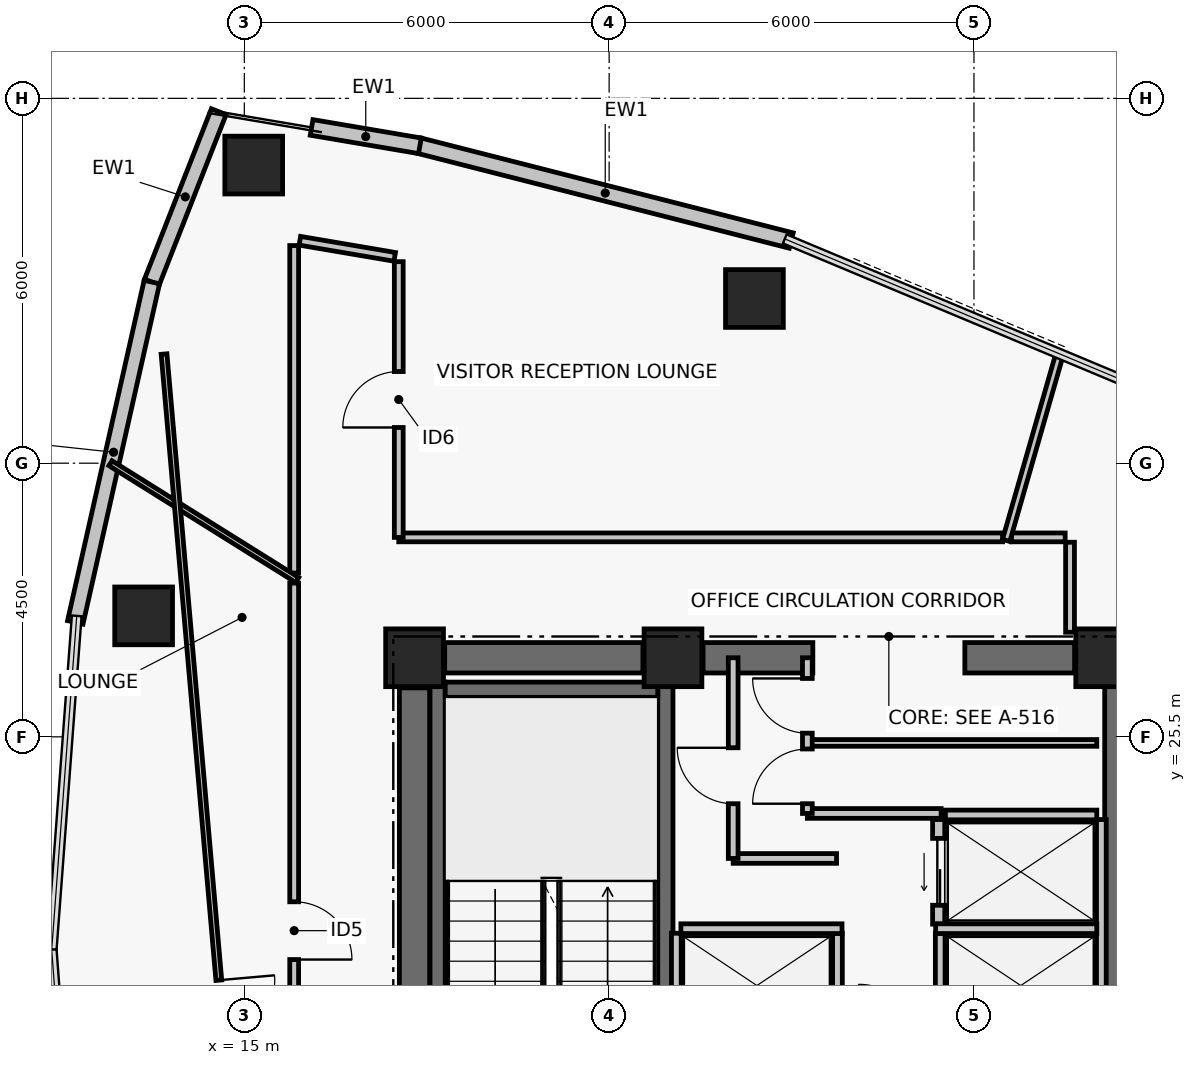
"""IFC4 building model, lengths in metres.
Left out: names, types, materials, properties, quantities, classifications, styles, units other than length and angle.
Written with IfcOpenShell. Run it as: python <this file> out.ifc"""

import sys

from ifc_helpers import new_model, si_unit, direction, frame, frame_2d, origin, origin_2d, place, context, subcontext, project, spatial, rectangle, hollow_rectangle, extrude, element, fill, save


model = new_model("IFC4")
c1 = context("Model", 3, precision=1e-05, world=origin(), true_north=direction((0.0, 1.0)))
c2 = subcontext(c1, "Body", "Model", "MODEL_VIEW")
j1 = project(units=[si_unit("LENGTHUNIT", "METRE"), si_unit("PLANEANGLEUNIT", "RADIAN")], contexts=[c1])
p1 = place(None, origin())
s1 = spatial("IfcSite", under=j1, at=p1, CompositionType="ELEMENT")
p2 = place(p1, origin())
s2 = spatial("IfcBuilding", under=s1, at=p2, CompositionType="ELEMENT")
p3 = place(p2, frame((0.0, 0.0, 219.54)))
s3 = spatial("IfcBuildingStorey", under=s2, at=p3, CompositionType="ELEMENT", Elevation=219.54)
for number, where, z_axis, x_axis in (
    (1, (17.8, 26.8, 0.0), (0.0, 0.0, 1.0), (1.0, 0.0, 0.0)),
    (2, (22.05, 26.8, 0.0), (0.0, 0.0, 1.0), (1.0, 0.0, 0.0)),
    (3, (29.15, 26.8, 0.0), (0.0, 0.0, 1.0), (1.0, 0.0, 0.0)),
):
    element("IfcColumn", number, at=place(p3, frame(where, z_axis=z_axis, x_axis=x_axis)), inside=s3, PredefinedType="COLUMN", context=c2, shape_type="SweptSolid", body=[
        extrude(rectangle(XDim=0.95, YDim=0.95, at=origin_2d()), origin(), (0.0, 0.0, 1.0), 3.72),
    ])
p4 = place(p3, frame((18.295, 26.8, 0.0), z_axis=(0.0, 0.0, 1.0), x_axis=(1.0, 0.0, 0.0)))
e4 = element("IfcWall", 4, at=p4, inside=s3, PredefinedType="SHEAR", context=c2, shape_type="SweptSolid", body=[
    extrude(rectangle(XDim=3.26, YDim=0.5, at=frame_2d((1.63, 0.0))), origin(), (0.0, 0.0, 1.0), 3.5),
])
p5 = place(p3, frame((22.545, 26.8, 0.0), z_axis=(0.0, 0.0, 1.0), x_axis=(1.0, 0.0, 0.0)))
e5 = element("IfcWall", 5, at=p5, inside=s3, PredefinedType="SHEAR", context=c2, shape_type="SweptSolid", body=[
    extrude(rectangle(XDim=1.805, YDim=0.5, at=frame_2d((0.903, 0.0))), origin(), (0.0, 0.0, 1.0), 3.5),
])
p6 = place(p3, frame((26.85, 26.8, 0.0), z_axis=(0.0, 0.0, 1.0), x_axis=(1.0, 0.0, 0.0)))
e6 = element("IfcWall", 6, at=p6, inside=s3, PredefinedType="SHEAR", context=c2, shape_type="SweptSolid", body=[
    extrude(rectangle(XDim=1.805, YDim=0.5, at=frame_2d((0.902, 0.0))), origin(), (0.0, 0.0, 1.0), 3.5),
])
p7 = place(p3, frame((17.8, 17.695, 0.0), z_axis=(0.0, 0.0, 1.0), x_axis=(0.0, 1.0, 0.0)))
e7 = element("IfcWall", 7, at=p7, inside=s3, PredefinedType="SHEAR", context=c2, shape_type="SweptSolid", body=[
    extrude(rectangle(XDim=8.61, YDim=0.5, at=frame_2d((4.305, 0.0))), origin(), (0.0, 0.0, 1.0), 3.5),
])
p8 = place(p3, frame((18.179, 17.6, 0.0), z_axis=(0.0, 0.0, 1.0), x_axis=(0.0, 1.0, 0.0)))
e8 = element("IfcWall", 8, at=p8, inside=s3, PredefinedType="SHEAR", context=c2, shape_type="SweptSolid", body=[
    extrude(rectangle(XDim=8.8, YDim=0.25, at=frame_2d((4.4, 0.0))), origin(), (0.0, 0.0, 1.0), 3.5),
])
p9 = place(p3, frame((21.925, 17.6, 0.0), z_axis=(0.0, 0.0, 1.0), x_axis=(0.0, 1.0, 0.0)))
e9 = element("IfcWall", 9, at=p9, inside=s3, PredefinedType="SHEAR", context=c2, shape_type="SweptSolid", body=[
    extrude(rectangle(XDim=8.8, YDim=0.25, at=frame_2d((4.4, 0.0))), origin(), (0.0, 0.0, 1.0), 3.5),
])
p10 = place(p9, frame((0.35, 0.0, 0.0)))
e10 = element("IfcOpeningElement", 10, at=p10, cuts=e9, PredefinedType="OPENING", context=c2, shape_type="SweptSolid", body=[
    extrude(rectangle(XDim=1.05, YDim=2.08, at=frame_2d((0.525, 1.04))), frame((0.0, 0.135, 0.0), z_axis=(0.0, -1.0, 0.0), x_axis=(1.0, 0.0, 0.0)), (0.0, 0.0, 1.0), 0.27),
])
p11 = place(p3, frame((18.304, 26.275, 0.0), z_axis=(0.0, 0.0, 1.0), x_axis=(1.0, 0.0, 0.0)))
e11 = element("IfcWall", 11, at=p11, inside=s3, PredefinedType="SHEAR", context=c2, shape_type="SweptSolid", body=[
    extrude(rectangle(XDim=3.496, YDim=0.25, at=frame_2d((1.748, 0.0))), origin(), (0.0, 0.0, 1.0), 3.5),
])
p12 = place(p3, frame((29.275, 17.6, 0.0), z_axis=(0.0, 0.0, 1.0), x_axis=(0.0, 1.0, 0.0)))
e12 = element("IfcWall", 12, at=p12, inside=s3, PredefinedType="SHEAR", context=c2, shape_type="SweptSolid", body=[
    extrude(rectangle(XDim=8.8, YDim=0.25, at=frame_2d((4.4, 0.0))), origin(), (0.0, 0.0, 1.0), 3.5),
])
p13 = place(p12, frame((0.35, 0.0, 0.0)))
e13 = element("IfcOpeningElement", 13, at=p13, cuts=e12, PredefinedType="OPENING", context=c2, shape_type="SweptSolid", body=[
    extrude(rectangle(XDim=1.05, YDim=2.08, at=frame_2d((0.525, 1.04))), frame((0.0, 0.135, 0.0), z_axis=(0.0, -1.0, 0.0), x_axis=(1.0, 0.0, 0.0)), (0.0, 0.0, 1.0), 0.27),
])
for number, where, z_axis, x_axis in (
    (14, (23.389, 32.708, 0.0), (0.0, 0.0, 1.0), (1.0, 0.0, 0.0)),
    (15, (15.155, 34.903, 0.0), (0.0, 0.0, 1.0), (1.0, 0.0, 0.0)),
    (16, (13.344, 27.489, 0.0), (0.0, 0.0, 1.0), (1.0, 0.0, 0.0)),
):
    element("IfcColumn", number, at=place(p3, frame(where, z_axis=z_axis, x_axis=x_axis)), inside=s3, PredefinedType="COLUMN", context=c2, shape_type="SweptSolid", body=[
        extrude(hollow_rectangle(XDim=0.95, YDim=0.95, WallThickness=0.04, at=origin_2d()), origin(), (0.0, 0.0, 1.0), 3.72),
    ])
p14 = place(p3, frame((17.876, 35.222, 0.0), z_axis=(0.0, 0.0, 1.0), x_axis=(0.968976240439, -0.247153890246, 0.0)))
e17 = element("IfcWall", 17, at=p14, inside=s3, PredefinedType="PARTITIONING", context=c2, shape_type="SweptSolid", body=[
    extrude(rectangle(XDim=6.315, YDim=0.26, at=frame_2d((3.157, 0.0))), origin(), (0.0, 0.0, 1.0), 3.5),
])
p15 = place(p3, frame((16.107, 35.522, 0.0), z_axis=(0.0, 0.0, 1.0), x_axis=(0.985877723898, -0.167466753484, 0.0)))
e18 = element("IfcWall", 18, at=p15, inside=s3, PredefinedType="PARTITIONING", context=c2, shape_type="SweptSolid", body=[
    extrude(rectangle(XDim=1.806, YDim=0.26, at=frame_2d((0.903, 0.0))), origin(), (0.0, 0.0, 1.0), 3.5),
])
p16 = place(p3, frame((13.479, 32.979, 0.0), z_axis=(0.0, 0.0, 1.0), x_axis=(0.365609724313, 0.930768246927, 0.0)))
e19 = element("IfcWall", 19, at=p16, inside=s3, PredefinedType="PARTITIONING", context=c2, shape_type="SweptSolid", body=[
    extrude(rectangle(XDim=3.011, YDim=0.26, at=frame_2d((1.505, 0.0))), origin(), (0.0, 0.0, 1.0), 3.5),
])
p17 = place(p3, frame((12.22, 27.382, 0.0), z_axis=(0.0, 0.0, 1.0), x_axis=(0.219475737697, 0.975617958303, 0.0)))
e20 = element("IfcWall", 20, at=p17, inside=s3, PredefinedType="PARTITIONING", context=c2, shape_type="SweptSolid", body=[
    extrude(rectangle(XDim=5.737, YDim=0.26, at=frame_2d((2.868, 0.0))), origin(), (0.0, 0.0, 1.0), 3.5),
])
p18 = place(p3, frame((26.42, 22.42, 0.0), z_axis=(0.0, 0.0, 1.0), x_axis=(0.0, 1.0, 0.0)))
e21 = element("IfcWall", 21, at=p18, inside=s3, PredefinedType="PARTITIONING", context=c2, shape_type="SweptSolid", body=[
    extrude(rectangle(XDim=1.72, YDim=0.2, at=frame_2d((0.86, 0.0))), origin(), (0.0, 0.0, 1.0), 3.5),
])
p19 = place(p18, frame((0.31, 0.0, 0.0)))
e22 = element("IfcOpeningElement", 22, at=p19, cuts=e21, PredefinedType="OPENING", context=c2, shape_type="SweptSolid", body=[
    extrude(rectangle(XDim=1.1, YDim=2.08, at=frame_2d((0.55, 1.04))), frame((0.0, 0.11, 0.0), z_axis=(0.0, -1.0, 0.0), x_axis=(1.0, 0.0, 0.0)), (0.0, 0.0, 1.0), 0.22),
])
for number, where, z_axis, x_axis in (
    (23, (22.105, 20.56, 0.0), (0.0, 0.0, 1.0), (0.0, 1.0, 0.0)),
    (24, (24.755, 20.56, 0.0), (0.0, 0.0, 1.0), (0.0, 1.0, 0.0)),
):
    element("IfcWall", number, at=place(p3, frame(where, z_axis=z_axis, x_axis=x_axis)), inside=s3, PredefinedType="PARTITIONING", context=c2, shape_type="SweptSolid", body=[
        extrude(rectangle(XDim=1.71, YDim=0.16, at=frame_2d((0.855, 0.0))), origin(), (0.0, 0.0, 1.0), 3.5),
    ])
p20 = place(p3, frame((22.18, 22.345, 0.0), z_axis=(0.0, 0.0, 1.0), x_axis=(1.0, 0.0, 0.0)))
e25 = element("IfcWall", 25, at=p20, inside=s3, PredefinedType="PARTITIONING", context=c2, shape_type="SweptSolid", body=[
    extrude(rectangle(XDim=2.65, YDim=0.16, at=frame_2d((1.325, 0.0))), origin(), (0.0, 0.0, 1.0), 3.5),
])
p21 = place(p3, frame((29.095, 20.56, 0.0), z_axis=(0.0, 0.0, 1.0), x_axis=(0.0, 1.0, 0.0)))
e26 = element("IfcWall", 26, at=p21, inside=s3, PredefinedType="PARTITIONING", context=c2, shape_type="SweptSolid", body=[
    extrude(rectangle(XDim=3.58, YDim=0.16, at=frame_2d((1.79, 0.0))), origin(), (0.0, 0.0, 1.0), 3.5),
])
p22 = place(p3, frame((26.445, 20.56, 0.0), z_axis=(0.0, 0.0, 1.0), x_axis=(0.0, 1.0, 0.0)))
e27 = element("IfcWall", 27, at=p22, inside=s3, PredefinedType="PARTITIONING", context=c2, shape_type="SweptSolid", body=[
    extrude(rectangle(XDim=1.71, YDim=0.16, at=frame_2d((0.855, 0.0))), origin(), (0.0, 0.0, 1.0), 3.5),
])
p23 = place(p3, frame((26.37, 22.345, 0.0), z_axis=(0.0, 0.0, 1.0), x_axis=(1.0, 0.0, 0.0)))
e28 = element("IfcWall", 28, at=p23, inside=s3, PredefinedType="PARTITIONING", context=c2, shape_type="SweptSolid", body=[
    extrude(rectangle(XDim=2.65, YDim=0.16, at=frame_2d((1.325, 0.0))), origin(), (0.0, 0.0, 1.0), 3.5),
])
p24 = place(p3, frame((26.53, 24.215, 0.0), z_axis=(0.0, 0.0, 1.0), x_axis=(1.0, 0.0, 0.0)))
e29 = element("IfcWall", 29, at=p24, inside=s3, PredefinedType="PARTITIONING", context=c2, shape_type="SweptSolid", body=[
    extrude(rectangle(XDim=2.49, YDim=0.16, at=frame_2d((1.245, 0.0))), origin(), (0.0, 0.0, 1.0), 3.5),
])
p25 = place(p3, frame((23.04, 23.5, 0.0), z_axis=(0.0, 0.0, 1.0), x_axis=(1.0, 0.0, 0.0)))
e30 = element("IfcWall", 30, at=p25, inside=s3, PredefinedType="PARTITIONING", context=c2, shape_type="SweptSolid", body=[
    extrude(rectangle(XDim=1.7, YDim=0.16, at=frame_2d((0.85, 0.0))), origin(), (0.0, 0.0, 1.0), 3.5),
])
p26 = place(p3, frame((23.04, 23.5, 0.0), z_axis=(0.0, 0.0, 1.0), x_axis=(0.0, 1.0, 0.0)))
e31 = element("IfcWall", 31, at=p26, inside=s3, PredefinedType="PARTITIONING", context=c2, shape_type="SweptSolid", body=[
    extrude(rectangle(XDim=3.3, YDim=0.16, at=frame_2d((1.65, 0.0))), origin(), (0.0, 0.0, 1.0), 2.63),
])
p27 = place(p26, frame((0.9, 0.0, 0.0)))
e32 = element("IfcOpeningElement", 32, at=p27, cuts=e31, PredefinedType="OPENING", context=c2, shape_type="SweptSolid", body=[
    extrude(rectangle(XDim=0.92, YDim=2.05, at=frame_2d((0.46, 1.025))), frame((0.0, 0.09, 0.0), z_axis=(0.0, -1.0, 0.0), x_axis=(1.0, 0.0, 0.0)), (0.0, 0.0, 1.0), 0.18),
])
p28 = place(p3, frame((24.26, 24.24, 0.0), z_axis=(0.0, 0.0, 1.0), x_axis=(1.0, 0.0, 0.0)))
e33 = element("IfcWall", 33, at=p28, inside=s3, PredefinedType="PARTITIONING", context=c2, shape_type="SweptSolid", body=[
    extrude(rectangle(XDim=2.2, YDim=0.16, at=frame_2d((1.1, 0.0))), origin(), (0.0, 0.0, 1.0), 3.5),
])
p29 = place(p3, frame((24.26, 25.4, 0.0), z_axis=(0.0, 0.0, 1.0), x_axis=(1.0, 0.0, 0.0)))
e34 = element("IfcWall", 34, at=p29, inside=s3, PredefinedType="PARTITIONING", context=c2, shape_type="SweptSolid", body=[
    extrude(rectangle(XDim=4.76, YDim=0.11, at=frame_2d((2.38, 0.0))), origin(), (0.0, 0.0, 1.0), 3.5),
])
p30 = place(p3, frame((24.26, 24.24, 0.0), z_axis=(0.0, 0.0, 1.0), x_axis=(0.0, 1.0, 0.0)))
e35 = element("IfcWall", 35, at=p30, inside=s3, PredefinedType="PARTITIONING", context=c2, shape_type="SweptSolid", body=[
    extrude(rectangle(XDim=2.56, YDim=0.16, at=frame_2d((1.28, 0.0))), origin(), (0.0, 0.0, 1.0), 2.63),
])
p31 = place(p30, frame((0.16, 0.0, 0.0)))
e36 = element("IfcOpeningElement", 36, at=p31, cuts=e35, PredefinedType="OPENING", context=c2, shape_type="SweptSolid", body=[
    extrude(rectangle(XDim=0.9, YDim=2.02, at=frame_2d((0.45, 1.01))), frame((0.0, 0.09, 0.0), z_axis=(0.0, -1.0, 0.0), x_axis=(1.0, 0.0, 0.0)), (0.0, 0.0, 1.0), 0.18),
])
p32 = place(p30, frame((1.32, 0.0, 0.0)))
e37 = element("IfcOpeningElement", 37, at=p32, cuts=e35, PredefinedType="OPENING", context=c2, shape_type="SweptSolid", body=[
    extrude(rectangle(XDim=0.9, YDim=2.02, at=frame_2d((0.45, 1.01))), frame((0.0, 0.09, 0.0), z_axis=(0.0, -1.0, 0.0), x_axis=(1.0, 0.0, 0.0)), (0.0, 0.0, 1.0), 0.18),
])
p33 = place(p3, frame((28.58, 27.22, 0.0), z_axis=(0.0, 0.0, 1.0), x_axis=(0.0, 1.0, 0.0)))
e38 = element("IfcWall", 38, at=p33, inside=s3, PredefinedType="PARTITIONING", context=c2, shape_type="SweptSolid", body=[
    extrude(rectangle(XDim=1.48, YDim=0.145, at=frame_2d((0.74, 0.0))), origin(), (0.0, 0.0, 1.0), 2.63),
])
p34 = place(p3, frame((28.5, 28.78, 0.0), z_axis=(0.0, 0.0, 1.0), x_axis=(-1.0, 0.0, 0.0)))
e39 = element("IfcWall", 39, at=p34, inside=s3, PredefinedType="PARTITIONING", context=c2, shape_type="SweptSolid", body=[
    extrude(rectangle(XDim=0.883, YDim=0.145, at=frame_2d((0.441, 0.0))), origin(), (0.0, 0.0, 1.0), 3.5),
])
p35 = place(p3, frame((27.471, 28.78, 0.0), z_axis=(0.0, 0.0, 1.0), x_axis=(-1.0, 0.0, 0.0)))
e40 = element("IfcWall", 40, at=p35, inside=s3, PredefinedType="PARTITIONING", context=c2, shape_type="SweptSolid", body=[
    extrude(rectangle(XDim=9.931, YDim=0.145, at=frame_2d((4.966, 0.0))), origin(), (0.0, 0.0, 1.0), 2.78),
])
p36 = place(p3, frame((17.54, 28.78, 0.0), z_axis=(0.0, 0.0, 1.0), x_axis=(0.0, 1.0, 0.0)))
e41 = element("IfcWall", 41, at=p36, inside=s3, PredefinedType="PARTITIONING", context=c2, shape_type="SweptSolid", body=[
    extrude(rectangle(XDim=4.534, YDim=0.145, at=frame_2d((2.267, 0.0))), origin(), (0.0, 0.0, 1.0), 3.13),
])
p37 = place(p36, frame((1.807, 0.0, 0.0)))
e42 = element("IfcOpeningElement", 42, at=p37, cuts=e41, PredefinedType="OPENING", context=c2, shape_type="SweptSolid", body=[
    extrude(rectangle(XDim=0.92, YDim=2.05, at=frame_2d((0.46, 1.025))), frame((0.0, 0.083, 0.0), z_axis=(0.0, -1.0, 0.0), x_axis=(1.0, 0.0, 0.0)), (0.0, 0.0, 1.0), 0.165),
])
p38 = place(p3, frame((17.473, 33.393, 0.0), z_axis=(0.0, 0.0, 1.0), x_axis=(-0.985914419316, 0.167250583809, 0.0)))
e43 = element("IfcWall", 43, at=p38, inside=s3, PredefinedType="PARTITIONING", context=c2, shape_type="SweptSolid", body=[
    extrude(rectangle(XDim=1.582, YDim=0.145, at=frame_2d((0.791, 0.0))), origin(), (0.0, 0.0, 1.0), 3.5),
])
p39 = place(p3, frame((15.82, 33.579, 0.0), z_axis=(0.0, 0.0, 1.0), x_axis=(0.0, -1.0, 0.0)))
e44 = element("IfcWall", 44, at=p39, inside=s3, PredefinedType="PARTITIONING", context=c2, shape_type="SweptSolid", body=[
    extrude(rectangle(XDim=5.385, YDim=0.145, at=frame_2d((2.693, 0.0))), origin(), (0.0, 0.0, 1.0), 2.78),
])
p40 = place(p3, frame((15.82, 28.029, 0.0), z_axis=(0.0, 0.0, 1.0), x_axis=(0.0, -1.0, 0.0)))
e45 = element("IfcWall", 45, at=p40, inside=s3, PredefinedType="PARTITIONING", context=c2, shape_type="SweptSolid", body=[
    extrude(rectangle(XDim=14.741, YDim=0.145, at=frame_2d((7.37, 0.0))), origin(), (0.0, 0.0, 1.0), 2.78),
])
p41 = place(p40, frame((5.241, 0.0, 0.0)))
e46 = element("IfcOpeningElement", 46, at=p41, cuts=e45, PredefinedType="OPENING", context=c2, shape_type="SweptSolid", body=[
    extrude(rectangle(XDim=0.95, YDim=2.06, at=frame_2d((0.475, 1.03))), frame((0.0, 0.083, 0.0), z_axis=(0.0, -1.0, 0.0), x_axis=(1.0, 0.0, 0.0)), (0.0, 0.0, 1.0), 0.165),
])
p42 = place(p3, frame((27.53, 28.73, 0.0), z_axis=(0.0, 0.0, 1.0), x_axis=(0.275627571295, 0.961264501551, 0.0)))
e47 = element("IfcWall", 47, at=p42, inside=s3, PredefinedType="PARTITIONING", context=c2, shape_type="SweptSolid", body=[
    extrude(rectangle(XDim=3.201, YDim=0.125, at=frame_2d((1.601, 0.0))), origin(), (0.0, 0.0, 1.0), 2.98),
])
p43 = place(p3, frame((15.87, 28.08, 0.0), z_axis=(0.0, 0.0, 1.0), x_axis=(-0.848062676376, 0.529895930291, 0.0)))
e48 = element("IfcWall", 48, at=p43, inside=s3, PredefinedType="PARTITIONING", context=c2, shape_type="SweptSolid", body=[
    extrude(rectangle(XDim=3.622, YDim=0.095, at=frame_2d((1.811, 0.0))), origin(), (0.0, 0.0, 1.0), 2.98),
])
p44 = place(p3, frame((13.68, 31.795, 0.0), z_axis=(0.0, 0.0, 1.0), x_axis=(0.087160919272, -0.996194245191, 0.0)))
e49 = element("IfcWall", 49, at=p44, inside=s3, PredefinedType="PARTITIONING", context=c2, shape_type="SweptSolid", body=[
    extrude(rectangle(XDim=21.593, YDim=0.095, at=frame_2d((10.797, 0.0))), origin(), (0.0, 0.0, 1.0), 2.78),
])
p45 = place(p44, frame((10.336, 0.0, 0.0)))
e50 = element("IfcOpeningElement", 50, at=p45, cuts=e49, PredefinedType="OPENING", context=c2, shape_type="SweptSolid", body=[
    extrude(rectangle(XDim=0.92, YDim=2.05, at=frame_2d((0.46, 1.025))), frame((0.0, 0.057, 0.0), z_axis=(0.0, -1.0, 0.0), x_axis=(1.0, 0.0, 0.0)), (0.0, 0.0, 1.0), 0.115),
])
p46 = place(p19, origin())
e51 = element("IfcDoor", 51, at=p46, inside=s3, OperationType="DOUBLE_DOOR_SLIDING", PredefinedType="DOOR", context=c2, shape_type="SweptSolid", body=[
    extrude(rectangle(XDim=1.1, YDim=2.08, at=frame_2d((0.55, 1.04))), frame((0.0, 0.025, 0.0), z_axis=(0.0, -1.0, 0.0), x_axis=(1.0, 0.0, 0.0)), (0.0, 0.0, 1.0), 0.05),
])
fill(e22, e51)
p47 = place(p27, origin())
e52 = element("IfcDoor", 52, at=p47, inside=s3, OperationType="SINGLE_SWING_RIGHT", PredefinedType="DOOR", context=c2, shape_type="SweptSolid", body=[
    extrude(rectangle(XDim=0.92, YDim=2.05, at=frame_2d((0.46, 1.025))), frame((0.0, 0.025, 0.0), z_axis=(0.0, -1.0, 0.0), x_axis=(1.0, 0.0, 0.0)), (0.0, 0.0, 1.0), 0.05),
])
fill(e32, e52)
p48 = place(p31, origin())
e53 = element("IfcDoor", 53, at=p48, inside=s3, OperationType="SINGLE_SWING_LEFT", PredefinedType="DOOR", context=c2, shape_type="SweptSolid", body=[
    extrude(rectangle(XDim=0.9, YDim=2.02, at=frame_2d((0.45, 1.01))), frame((0.0, 0.025, 0.0), z_axis=(0.0, -1.0, 0.0), x_axis=(1.0, 0.0, 0.0)), (0.0, 0.0, 1.0), 0.05),
])
fill(e36, e53)
p49 = place(p32, origin())
e54 = element("IfcDoor", 54, at=p49, inside=s3, OperationType="SINGLE_SWING_RIGHT", PredefinedType="DOOR", context=c2, shape_type="SweptSolid", body=[
    extrude(rectangle(XDim=0.9, YDim=2.02, at=frame_2d((0.45, 1.01))), frame((0.0, 0.025, 0.0), z_axis=(0.0, -1.0, 0.0), x_axis=(1.0, 0.0, 0.0)), (0.0, 0.0, 1.0), 0.05),
])
fill(e37, e54)
p50 = place(p37, origin())
e55 = element("IfcDoor", 55, at=p50, inside=s3, OperationType="SINGLE_SWING_LEFT", PredefinedType="DOOR", context=c2, shape_type="SweptSolid", body=[
    extrude(rectangle(XDim=0.92, YDim=2.05, at=frame_2d((0.46, 1.025))), frame((0.0, 0.025, 0.0), z_axis=(0.0, -1.0, 0.0), x_axis=(1.0, 0.0, 0.0)), (0.0, 0.0, 1.0), 0.05),
])
fill(e42, e55)
p51 = place(p41, origin())
e56 = element("IfcDoor", 56, at=p51, inside=s3, OperationType="SINGLE_SWING_RIGHT", PredefinedType="DOOR", context=c2, shape_type="SweptSolid", body=[
    extrude(rectangle(XDim=0.95, YDim=2.06, at=frame_2d((0.475, 1.03))), frame((0.0, 0.025, 0.0), z_axis=(0.0, -1.0, 0.0), x_axis=(1.0, 0.0, 0.0)), (0.0, 0.0, 1.0), 0.05),
])
fill(e46, e56)
p52 = place(p45, origin())
e57 = element("IfcDoor", 57, at=p52, inside=s3, OperationType="SINGLE_SWING_LEFT", PredefinedType="DOOR", context=c2, shape_type="SweptSolid", body=[
    extrude(rectangle(XDim=0.92, YDim=2.05, at=frame_2d((0.46, 1.025))), frame((0.0, 0.025, 0.0), z_axis=(0.0, -1.0, 0.0), x_axis=(1.0, 0.0, 0.0)), (0.0, 0.0, 1.0), 0.05),
])
fill(e50, e57)
save(model, sys.argv[1])
